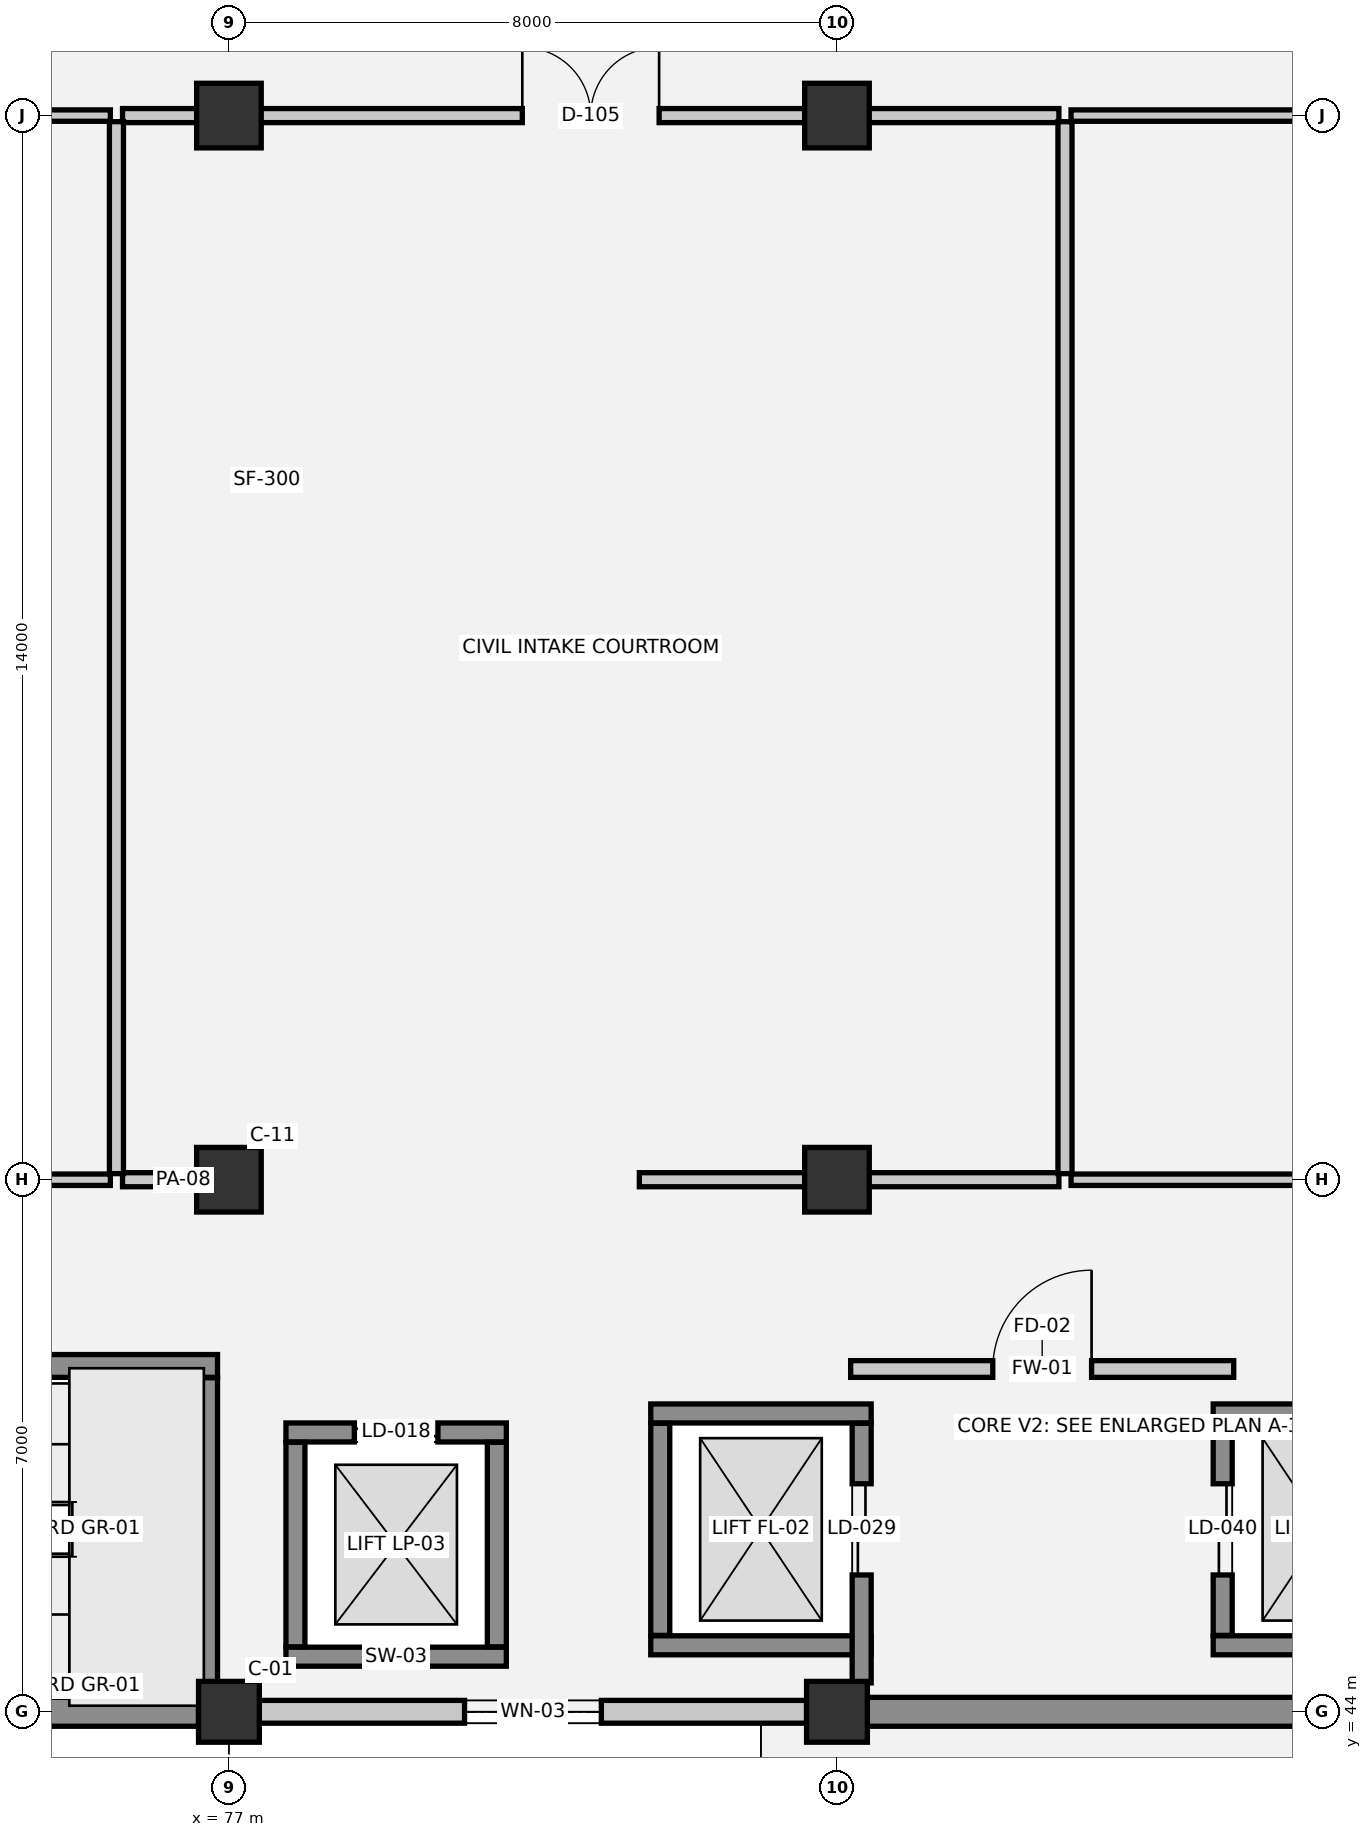
"""IFC4 building model, lengths in metres.
Left out: names, types, materials, properties, quantities, classifications, styles, units other than length and angle.
Written with IfcOpenShell. Run it as: python <this file> out.ifc"""

import sys

from ifc_helpers import new_model, si_unit, direction, frame, frame_2d, origin, origin_2d, place, context, subcontext, project, spatial, rectangle, extrude, element, fill, save


model = new_model("IFC4")
c1 = context("Model", 3, precision=1e-05, world=origin(), true_north=direction((0.0, 1.0)))
c2 = subcontext(c1, "Body", "Model", "MODEL_VIEW")
j1 = project(units=[si_unit("LENGTHUNIT", "METRE"), si_unit("PLANEANGLEUNIT", "RADIAN")], contexts=[c1])
p1 = place(None, origin())
s1 = spatial("IfcSite", under=j1, at=p1, CompositionType="ELEMENT")
p2 = place(p1, origin())
s2 = spatial("IfcBuilding", under=s1, at=p2, CompositionType="ELEMENT")
p3 = place(p2, origin())
s3 = spatial("IfcBuildingStorey", under=s2, at=p3, CompositionType="ELEMENT", Elevation=0.0)
p4 = place(p3, frame((77.0, 44.0, 0.0), z_axis=(0.0, 0.0, 1.0), x_axis=(1.0, 0.0, 0.0)))
e1 = element("IfcColumn", 1, at=p4, inside=s3, PredefinedType="COLUMN", context=c2, shape_type="SweptSolid", body=[
    extrude(rectangle(XDim=0.8, YDim=0.8, at=origin_2d()), origin(), (0.0, 0.0, 1.0), 5.4),
])
for number, where, z_axis, x_axis in (
    (2, (77.0, 51.0, 0.0), (0.0, 0.0, 1.0), (1.0, 0.0, 0.0)),
    (3, (77.0, 65.0, 0.0), (0.0, 0.0, 1.0), (1.0, 0.0, 0.0)),
):
    element("IfcColumn", number, at=place(p3, frame(where, z_axis=z_axis, x_axis=x_axis)), inside=s3, PredefinedType="COLUMN", context=c2, shape_type="SweptSolid", body=[
        extrude(rectangle(XDim=0.85, YDim=0.85, at=origin_2d()), origin(), (0.0, 0.0, 1.0), 5.4),
    ])
p5 = place(p3, frame((85.0, 44.0, 0.0), z_axis=(0.0, 0.0, 1.0), x_axis=(1.0, 0.0, 0.0)))
e4 = element("IfcColumn", 4, at=p5, inside=s3, PredefinedType="COLUMN", context=c2, shape_type="SweptSolid", body=[
    extrude(rectangle(XDim=0.8, YDim=0.8, at=origin_2d()), origin(), (0.0, 0.0, 1.0), 5.4),
])
for number, where, z_axis, x_axis in (
    (5, (85.0, 51.0, 0.0), (0.0, 0.0, 1.0), (1.0, 0.0, 0.0)),
    (6, (85.0, 65.0, 0.0), (0.0, 0.0, 1.0), (1.0, 0.0, 0.0)),
):
    element("IfcColumn", number, at=place(p3, frame(where, z_axis=z_axis, x_axis=x_axis)), inside=s3, PredefinedType="COLUMN", context=c2, shape_type="SweptSolid", body=[
        extrude(rectangle(XDim=0.85, YDim=0.85, at=origin_2d()), origin(), (0.0, 0.0, 1.0), 5.4),
    ])
p6 = place(p3, frame((92.6, 44.0, 0.0), z_axis=(0.0, 0.0, 1.0), x_axis=(-1.0, 0.0, 0.0)))
e7 = element("IfcWall", 7, at=p6, inside=s3, PredefinedType="STANDARD", context=c2, shape_type="SweptSolid", body=[
    extrude(rectangle(XDim=7.2, YDim=0.38, at=frame_2d((3.6, 0.0))), origin(), (0.0, 0.0, 1.0), 4.13),
])
p7 = place(p3, frame((84.6, 44.0, 0.0), z_axis=(0.0, 0.0, 1.0), x_axis=(-1.0, 0.0, 0.0)))
e8 = element("IfcWall", 8, at=p7, inside=s3, PredefinedType="SOLIDWALL", context=c2, shape_type="SweptSolid", body=[
    extrude(rectangle(XDim=7.2, YDim=0.3, at=frame_2d((3.6, 0.0))), origin(), (0.0, 0.0, 1.0), 4.13),
])
p8 = place(p7, frame((2.7, 0.0, 0.9)))
e9 = element("IfcOpeningElement", 9, at=p8, cuts=e8, PredefinedType="OPENING", context=c2, shape_type="SweptSolid", body=[
    extrude(rectangle(XDim=1.8, YDim=2.0, at=frame_2d((0.9, 1.0))), frame((0.0, 0.16, 0.0), z_axis=(0.0, -1.0, 0.0), x_axis=(1.0, 0.0, 0.0)), (0.0, 0.0, 1.0), 0.32),
])
p9 = place(p3, frame((76.6, 44.0, 0.0), z_axis=(0.0, 0.0, 1.0), x_axis=(-1.0, 0.0, 0.0)))
e10 = element("IfcWall", 10, at=p9, inside=s3, PredefinedType="STANDARD", context=c2, shape_type="SweptSolid", body=[
    extrude(rectangle(XDim=7.2, YDim=0.38, at=frame_2d((3.6, 0.0))), origin(), (0.0, 0.0, 1.0), 4.13),
])
p10 = place(p9, frame((3.075, 0.0, 0.95)))
e11 = element("IfcOpeningElement", 11, at=p10, cuts=e10, PredefinedType="OPENING", context=c2, shape_type="SweptSolid", body=[
    extrude(rectangle(XDim=1.05, YDim=1.6, at=frame_2d((0.525, 0.8))), frame((0.0, 0.2, 0.0), z_axis=(0.0, -1.0, 0.0), x_axis=(1.0, 0.0, 0.0)), (0.0, 0.0, 1.0), 0.4),
])
p11 = place(p3, frame((77.75, 44.725, 0.0), z_axis=(0.0, 0.0, 1.0), x_axis=(1.0, 0.0, 0.0)))
e12 = element("IfcWall", 12, at=p11, inside=s3, PredefinedType="SHEAR", context=c2, shape_type="SweptSolid", body=[
    extrude(rectangle(XDim=2.9, YDim=0.25, at=frame_2d((1.45, 0.0))), origin(), (0.0, 0.0, 1.0), 5.4),
])
p12 = place(p3, frame((80.65, 47.675, 0.0), z_axis=(0.0, 0.0, 1.0), x_axis=(-1.0, 0.0, 0.0)))
e13 = element("IfcWall", 13, at=p12, inside=s3, PredefinedType="SHEAR", context=c2, shape_type="SweptSolid", body=[
    extrude(rectangle(XDim=2.9, YDim=0.25, at=frame_2d((1.45, 0.0))), origin(), (0.0, 0.0, 1.0), 5.4),
])
p13 = place(p12, frame((0.9, 0.0, 0.0)))
e14 = element("IfcOpeningElement", 14, at=p13, cuts=e13, PredefinedType="OPENING", context=c2, shape_type="SweptSolid", body=[
    extrude(rectangle(XDim=1.1, YDim=2.15, at=frame_2d((0.55, 1.075))), frame((0.0, 0.135, 0.0), z_axis=(0.0, -1.0, 0.0), x_axis=(1.0, 0.0, 0.0)), (0.0, 0.0, 1.0), 0.27),
])
for number, where, z_axis, x_axis in (
    (15, (77.875, 47.545, 0.0), (0.0, 0.0, 1.0), (0.0, -1.0, 0.0)),
    (16, (80.525, 44.855, 0.0), (0.0, 0.0, 1.0), (0.0, 1.0, 0.0)),
):
    element("IfcWall", number, at=place(p3, frame(where, z_axis=z_axis, x_axis=x_axis)), inside=s3, PredefinedType="SHEAR", context=c2, shape_type="SweptSolid", body=[
        extrude(rectangle(XDim=2.69, YDim=0.25, at=frame_2d((1.345, 0.0))), origin(), (0.0, 0.0, 1.0), 5.4),
    ])
for number, where, z_axis, x_axis in (
    (17, (82.55, 44.875, 0.0), (0.0, 0.0, 1.0), (1.0, 0.0, 0.0)),
    (18, (85.45, 47.925, 0.0), (0.0, 0.0, 1.0), (-1.0, 0.0, 0.0)),
):
    element("IfcWall", number, at=place(p3, frame(where, z_axis=z_axis, x_axis=x_axis)), inside=s3, PredefinedType="SHEAR", context=c2, shape_type="SweptSolid", body=[
        extrude(rectangle(XDim=2.9, YDim=0.25, at=frame_2d((1.45, 0.0))), origin(), (0.0, 0.0, 1.0), 5.4),
    ])
p14 = place(p3, frame((82.675, 47.795, 0.0), z_axis=(0.0, 0.0, 1.0), x_axis=(0.0, -1.0, 0.0)))
e19 = element("IfcWall", 19, at=p14, inside=s3, PredefinedType="SHEAR", context=c2, shape_type="SweptSolid", body=[
    extrude(rectangle(XDim=2.79, YDim=0.25, at=frame_2d((1.395, 0.0))), origin(), (0.0, 0.0, 1.0), 5.4),
])
p15 = place(p3, frame((85.325, 44.38, 0.0), z_axis=(0.0, 0.0, 1.0), x_axis=(0.0, 1.0, 0.0)))
e20 = element("IfcWall", 20, at=p15, inside=s3, PredefinedType="SHEAR", context=c2, shape_type="SweptSolid", body=[
    extrude(rectangle(XDim=3.415, YDim=0.25, at=frame_2d((1.708, 0.0))), origin(), (0.0, 0.0, 1.0), 5.4),
])
p16 = place(p15, frame((1.42, 0.0, 0.0)))
e21 = element("IfcOpeningElement", 21, at=p16, cuts=e20, PredefinedType="OPENING", context=c2, shape_type="SweptSolid", body=[
    extrude(rectangle(XDim=1.2, YDim=2.2, at=frame_2d((0.6, 1.1))), frame((0.0, 0.135, 0.0), z_axis=(0.0, -1.0, 0.0), x_axis=(1.0, 0.0, 0.0)), (0.0, 0.0, 1.0), 0.27),
])
for number, where, z_axis, x_axis in (
    (22, (89.95, 44.875, 0.0), (0.0, 0.0, 1.0), (1.0, 0.0, 0.0)),
    (23, (92.85, 47.925, 0.0), (0.0, 0.0, 1.0), (-1.0, 0.0, 0.0)),
):
    element("IfcWall", number, at=place(p3, frame(where, z_axis=z_axis, x_axis=x_axis)), inside=s3, PredefinedType="SHEAR", context=c2, shape_type="SweptSolid", body=[
        extrude(rectangle(XDim=2.9, YDim=0.25, at=frame_2d((1.45, 0.0))), origin(), (0.0, 0.0, 1.0), 5.4),
    ])
p17 = place(p3, frame((90.075, 47.795, 0.0), z_axis=(0.0, 0.0, 1.0), x_axis=(0.0, -1.0, 0.0)))
e24 = element("IfcWall", 24, at=p17, inside=s3, PredefinedType="SHEAR", context=c2, shape_type="SweptSolid", body=[
    extrude(rectangle(XDim=2.79, YDim=0.25, at=frame_2d((1.395, 0.0))), origin(), (0.0, 0.0, 1.0), 5.4),
])
p18 = place(p17, frame((0.795, 0.0, 0.0)))
e25 = element("IfcOpeningElement", 25, at=p18, cuts=e24, PredefinedType="OPENING", context=c2, shape_type="SweptSolid", body=[
    extrude(rectangle(XDim=1.2, YDim=2.2, at=frame_2d((0.6, 1.1))), frame((0.0, 0.135, 0.0), z_axis=(0.0, -1.0, 0.0), x_axis=(1.0, 0.0, 0.0)), (0.0, 0.0, 1.0), 0.27),
])
p19 = place(p3, frame((69.15, 48.55, 0.0), z_axis=(0.0, 0.0, 1.0), x_axis=(1.0, 0.0, 0.0)))
e26 = element("IfcWall", 26, at=p19, inside=s3, PredefinedType="SHEAR", context=c2, shape_type="SweptSolid", body=[
    extrude(rectangle(XDim=7.7, YDim=0.3, at=frame_2d((3.85, 0.0))), origin(), (0.0, 0.0, 1.0), 5.1),
])
p20 = place(p19, frame((0.375, 0.0, 0.0)))
e27 = element("IfcOpeningElement", 27, at=p20, cuts=e26, PredefinedType="OPENING", context=c2, shape_type="SweptSolid", body=[
    extrude(rectangle(XDim=1.35, YDim=2.2, at=frame_2d((0.675, 1.1))), frame((0.0, 0.16, 0.0), z_axis=(0.0, -1.0, 0.0), x_axis=(1.0, 0.0, 0.0)), (0.0, 0.0, 1.0), 0.32),
])
p21 = place(p3, frame((76.7, 44.195, 0.0), z_axis=(0.0, 0.0, 1.0), x_axis=(0.0, 1.0, 0.0)))
e28 = element("IfcWall", 28, at=p21, inside=s3, PredefinedType="SHEAR", context=c2, shape_type="SweptSolid", body=[
    extrude(rectangle(XDim=4.2, YDim=0.3, at=frame_2d((2.1, 0.0))), origin(), (0.0, 0.0, 1.0), 5.1),
])
p22 = place(p3, frame((85.18, 48.51, 0.0), z_axis=(0.0, 0.0, 1.0), x_axis=(1.0, 0.0, 0.0)))
e29 = element("IfcWall", 29, at=p22, inside=s3, PredefinedType="SOLIDWALL", context=c2, shape_type="SweptSolid", body=[
    extrude(rectangle(XDim=5.04, YDim=0.22, at=frame_2d((2.52, 0.0))), origin(), (0.0, 0.0, 1.0), 5.1),
])
p23 = place(p22, frame((1.87, 0.0, 0.0)))
e30 = element("IfcOpeningElement", 30, at=p23, cuts=e29, PredefinedType="OPENING", context=c2, shape_type="SweptSolid", body=[
    extrude(rectangle(XDim=1.3, YDim=2.15, at=frame_2d((0.65, 1.075))), frame((0.0, 0.12, 0.0), z_axis=(0.0, -1.0, 0.0), x_axis=(1.0, 0.0, 0.0)), (0.0, 0.0, 1.0), 0.24),
])
p24 = place(p3, frame((62.08, 51.0, 0.0), z_axis=(0.0, 0.0, 1.0), x_axis=(1.0, 0.0, 0.0)))
e31 = element("IfcWall", 31, at=p24, inside=s3, PredefinedType="PARTITIONING", context=c2, shape_type="SweptSolid", body=[
    extrude(rectangle(XDim=13.36, YDim=0.15, at=frame_2d((6.68, 0.0))), origin(), (0.0, 0.0, 1.0), 4.3),
])
p25 = place(p24, frame((4.424, 0.0, 0.0)))
e32 = element("IfcOpeningElement", 32, at=p25, cuts=e31, PredefinedType="OPENING", context=c2, shape_type="SweptSolid", body=[
    extrude(rectangle(XDim=1.02, YDim=2.15, at=frame_2d((0.51, 1.075))), frame((0.0, 0.085, 0.0), z_axis=(0.0, -1.0, 0.0), x_axis=(1.0, 0.0, 0.0)), (0.0, 0.0, 1.0), 0.17),
])
p26 = place(p3, frame((75.6, 51.0, 0.0), z_axis=(0.0, 0.0, 1.0), x_axis=(1.0, 0.0, 0.0)))
e33 = element("IfcWall", 33, at=p26, inside=s3, PredefinedType="PARTITIONING", context=c2, shape_type="SweptSolid", body=[
    extrude(rectangle(XDim=1.6, YDim=0.185, at=frame_2d((0.8, 0.0))), origin(), (0.0, 0.0, 1.0), 4.3),
])
p27 = place(p3, frame((82.4, 51.0, 0.0), z_axis=(0.0, 0.0, 1.0), x_axis=(1.0, 0.0, 0.0)))
e34 = element("IfcWall", 34, at=p27, inside=s3, PredefinedType="PARTITIONING", context=c2, shape_type="SweptSolid", body=[
    extrude(rectangle(XDim=5.52, YDim=0.185, at=frame_2d((2.76, 0.0))), origin(), (0.0, 0.0, 1.0), 4.3),
])
p28 = place(p3, frame((88.08, 51.0, 0.0), z_axis=(0.0, 0.0, 1.0), x_axis=(1.0, 0.0, 0.0)))
e35 = element("IfcWall", 35, at=p28, inside=s3, PredefinedType="PARTITIONING", context=c2, shape_type="SweptSolid", body=[
    extrude(rectangle(XDim=10.24, YDim=0.15, at=frame_2d((5.12, 0.0))), origin(), (0.0, 0.0, 1.0), 4.3),
])
p29 = place(p3, frame((62.08, 65.0, 0.0), z_axis=(0.0, 0.0, 1.0), x_axis=(1.0, 0.0, 0.0)))
e36 = element("IfcWall", 36, at=p29, inside=s3, PredefinedType="PARTITIONING", context=c2, shape_type="SweptSolid", body=[
    extrude(rectangle(XDim=13.36, YDim=0.15, at=frame_2d((6.68, 0.0))), origin(), (0.0, 0.0, 1.0), 4.3),
])
p30 = place(p3, frame((75.6, 65.0, 0.0), z_axis=(0.0, 0.0, 1.0), x_axis=(1.0, 0.0, 0.0)))
e37 = element("IfcWall", 37, at=p30, inside=s3, PredefinedType="PARTITIONING", context=c2, shape_type="SweptSolid", body=[
    extrude(rectangle(XDim=12.32, YDim=0.185, at=frame_2d((6.16, 0.0))), origin(), (0.0, 0.0, 1.0), 4.3),
])
p31 = place(p30, frame((5.26, 0.0, 0.0)))
e38 = element("IfcOpeningElement", 38, at=p31, cuts=e37, PredefinedType="OPENING", context=c2, shape_type="SweptSolid", body=[
    extrude(rectangle(XDim=1.8, YDim=2.3, at=frame_2d((0.9, 1.15))), frame((0.0, 0.103, 0.0), z_axis=(0.0, -1.0, 0.0), x_axis=(1.0, 0.0, 0.0)), (0.0, 0.0, 1.0), 0.205),
])
p32 = place(p3, frame((88.08, 65.0, 0.0), z_axis=(0.0, 0.0, 1.0), x_axis=(1.0, 0.0, 0.0)))
e39 = element("IfcWall", 39, at=p32, inside=s3, PredefinedType="PARTITIONING", context=c2, shape_type="SweptSolid", body=[
    extrude(rectangle(XDim=10.24, YDim=0.15, at=frame_2d((5.12, 0.0))), origin(), (0.0, 0.0, 1.0), 4.3),
])
for number, where, z_axis, x_axis in (
    (40, (75.52, 51.08, 0.0), (0.0, 0.0, 1.0), (0.0, 1.0, 0.0)),
    (41, (88.0, 51.08, 0.0), (0.0, 0.0, 1.0), (0.0, 1.0, 0.0)),
):
    element("IfcWall", number, at=place(p3, frame(where, z_axis=z_axis, x_axis=x_axis)), inside=s3, PredefinedType="PARTITIONING", context=c2, shape_type="SweptSolid", body=[
        extrude(rectangle(XDim=13.84, YDim=0.185, at=frame_2d((6.92, 0.0))), origin(), (0.0, 0.0, 1.0), 5.04),
    ])
p33 = place(p8, origin())
e42 = element("IfcWindow", 42, at=p33, inside=s3, PartitioningType="SINGLE_PANEL", PredefinedType="WINDOW", context=c2, shape_type="SweptSolid", body=[
    extrude(rectangle(XDim=1.8, YDim=2.0, at=frame_2d((0.9, 1.0))), frame((0.0, 0.03, 0.0), z_axis=(0.0, -1.0, 0.0), x_axis=(1.0, 0.0, 0.0)), (0.0, 0.0, 1.0), 0.06),
])
fill(e9, e42)
p34 = place(p13, origin())
e43 = element("IfcDoor", 43, at=p34, inside=s3, OperationType="DOUBLE_DOOR_SLIDING", PredefinedType="DOOR", context=c2, shape_type="SweptSolid", body=[
    extrude(rectangle(XDim=1.1, YDim=2.15, at=frame_2d((0.55, 1.075))), frame((0.0, 0.025, 0.0), z_axis=(0.0, -1.0, 0.0), x_axis=(1.0, 0.0, 0.0)), (0.0, 0.0, 1.0), 0.05),
])
fill(e14, e43)
p35 = place(p16, origin())
e44 = element("IfcDoor", 44, at=p35, inside=s3, OperationType="DOUBLE_DOOR_SLIDING", PredefinedType="DOOR", context=c2, shape_type="SweptSolid", body=[
    extrude(rectangle(XDim=1.2, YDim=2.2, at=frame_2d((0.6, 1.1))), frame((0.0, 0.025, 0.0), z_axis=(0.0, -1.0, 0.0), x_axis=(1.0, 0.0, 0.0)), (0.0, 0.0, 1.0), 0.05),
])
fill(e21, e44)
p36 = place(p18, origin())
e45 = element("IfcDoor", 45, at=p36, inside=s3, OperationType="DOUBLE_DOOR_SLIDING", PredefinedType="DOOR", context=c2, shape_type="SweptSolid", body=[
    extrude(rectangle(XDim=1.2, YDim=2.2, at=frame_2d((0.6, 1.1))), frame((0.0, 0.025, 0.0), z_axis=(0.0, -1.0, 0.0), x_axis=(1.0, 0.0, 0.0)), (0.0, 0.0, 1.0), 0.05),
])
fill(e25, e45)
p37 = place(p23, origin())
e46 = element("IfcDoor", 46, at=p37, inside=s3, OperationType="SINGLE_SWING_RIGHT", PredefinedType="DOOR", context=c2, shape_type="SweptSolid", body=[
    extrude(rectangle(XDim=1.3, YDim=2.15, at=frame_2d((0.65, 1.075))), frame((0.0, 0.025, 0.0), z_axis=(0.0, -1.0, 0.0), x_axis=(1.0, 0.0, 0.0)), (0.0, 0.0, 1.0), 0.05),
])
fill(e30, e46)
p38 = place(p31, origin())
e47 = element("IfcDoor", 47, at=p38, inside=s3, OperationType="DOUBLE_DOOR_SINGLE_SWING", PredefinedType="DOOR", context=c2, shape_type="SweptSolid", body=[
    extrude(rectangle(XDim=1.8, YDim=2.3, at=frame_2d((0.9, 1.15))), frame((0.0, 0.025, 0.0), z_axis=(0.0, -1.0, 0.0), x_axis=(1.0, 0.0, 0.0)), (0.0, 0.0, 1.0), 0.05),
])
fill(e38, e47)
save(model, sys.argv[1])
